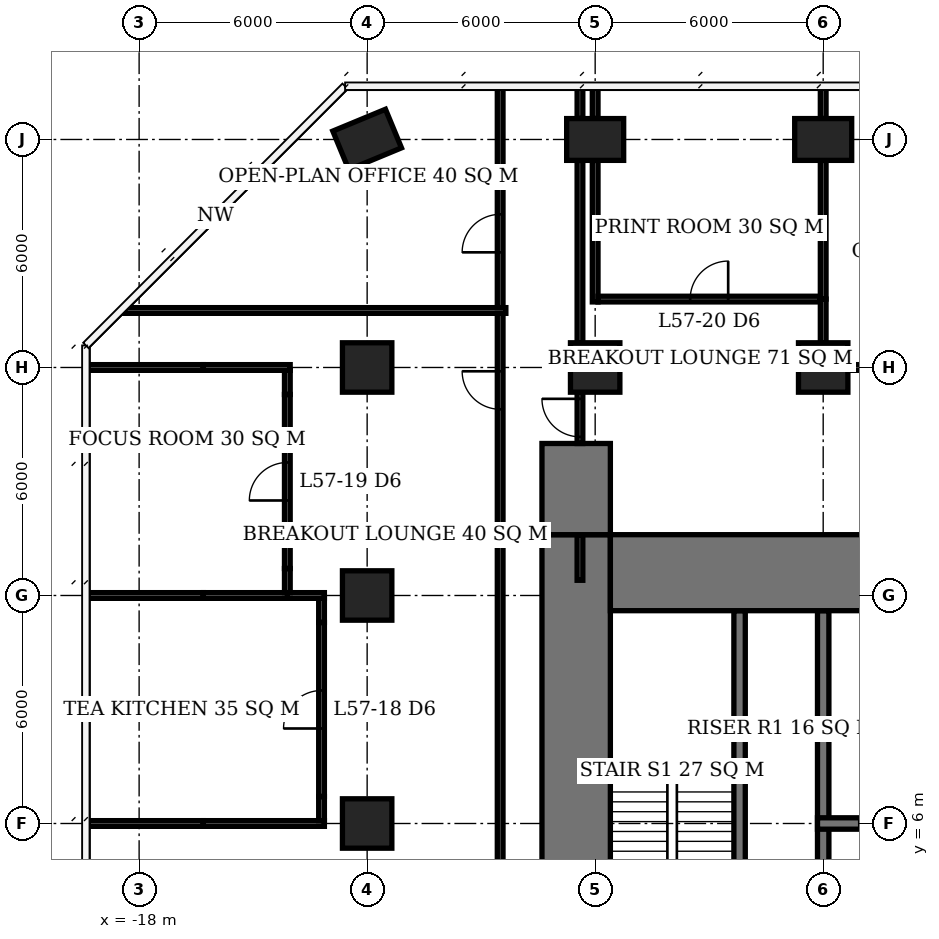
"""IFC4 building model, lengths in metres.
Left out: names, types, materials, properties, quantities, classifications, styles, units other than length and angle.
Written with IfcOpenShell. Run it as: python <this file> out.ifc"""

import sys

from ifc_helpers import new_model, si_unit, direction, frame, frame_2d, origin, origin_2d, place, context, subcontext, project, spatial, rectangle, extrude, element, fill, save


model = new_model("IFC4")
c1 = context("Model", 3, precision=1e-05, world=origin(), true_north=direction((0.0, 1.0)))
c2 = subcontext(c1, "Body", "Model", "MODEL_VIEW")
j1 = project(units=[si_unit("LENGTHUNIT", "METRE"), si_unit("PLANEANGLEUNIT", "RADIAN")], contexts=[c1])
p1 = place(None, origin())
s1 = spatial("IfcSite", under=j1, at=p1, CompositionType="ELEMENT")
p2 = place(p1, origin())
s2 = spatial("IfcBuilding", under=s1, at=p2, CompositionType="ELEMENT")
p3 = place(p2, frame((0.0, 0.0, 231.8)))
s3 = spatial("IfcBuildingStorey", under=s2, at=p3, CompositionType="ELEMENT", Elevation=231.8)
for number, where, z_axis, x_axis in (
    (1, (-12.0, 6.0, 0.0), (0.0, 0.0, 1.0), (1.0, 0.0, 0.0)),
    (2, (-12.0, 12.0, 0.0), (0.0, 0.0, 1.0), (1.0, 0.0, 0.0)),
    (3, (-12.0, 18.0, 0.0), (0.0, 0.0, 1.0), (1.0, 0.0, 0.0)),
):
    element("IfcColumn", number, at=place(p3, frame(where, z_axis=z_axis, x_axis=x_axis)), inside=s3, PredefinedType="COLUMN", context=c2, shape_type="SweptSolid", body=[
        extrude(rectangle(XDim=1.3, YDim=1.3, at=origin_2d()), origin(), (0.0, 0.0, 1.0), 3.9),
    ])
p4 = place(p3, frame((-12.0, 24.0, 0.0), z_axis=(0.0, 0.0, 1.0), x_axis=(0.923879532511, 0.382683432365, 0.0)))
e4 = element("IfcColumn", 4, at=p4, inside=s3, PredefinedType="COLUMN", context=c2, shape_type="SweptSolid", body=[
    extrude(rectangle(XDim=1.5, YDim=1.1, at=origin_2d()), origin(), (0.0, 0.0, 1.0), 3.9),
])
p5 = place(p3, frame((-6.0, 18.0, 0.0), z_axis=(0.0, 0.0, 1.0), x_axis=(1.0, 0.0, 0.0)))
e5 = element("IfcColumn", 5, at=p5, inside=s3, PredefinedType="COLUMN", context=c2, shape_type="SweptSolid", body=[
    extrude(rectangle(XDim=1.3, YDim=1.3, at=origin_2d()), origin(), (0.0, 0.0, 1.0), 3.9),
])
p6 = place(p3, frame((-6.0, 24.0, 0.0), z_axis=(0.0, 0.0, 1.0), x_axis=(1.0, 0.0, 0.0)))
e6 = element("IfcColumn", 6, at=p6, inside=s3, PredefinedType="COLUMN", context=c2, shape_type="SweptSolid", body=[
    extrude(rectangle(XDim=1.5, YDim=1.1, at=origin_2d()), origin(), (0.0, 0.0, 1.0), 3.9),
])
p7 = place(p3, frame((0.0, 18.0, 0.0), z_axis=(0.0, 0.0, 1.0), x_axis=(1.0, 0.0, 0.0)))
e7 = element("IfcColumn", 7, at=p7, inside=s3, PredefinedType="COLUMN", context=c2, shape_type="SweptSolid", body=[
    extrude(rectangle(XDim=1.3, YDim=1.3, at=origin_2d()), origin(), (0.0, 0.0, 1.0), 3.9),
])
p8 = place(p3, frame((0.0, 24.0, 0.0), z_axis=(0.0, 0.0, 1.0), x_axis=(1.0, 0.0, 0.0)))
e8 = element("IfcColumn", 8, at=p8, inside=s3, PredefinedType="COLUMN", context=c2, shape_type="SweptSolid", body=[
    extrude(rectangle(XDim=1.5, YDim=1.1, at=origin_2d()), origin(), (0.0, 0.0, 1.0), 3.9),
])
p9 = place(p3, frame((-5.6, 12.6, 0.0), z_axis=(0.0, 0.0, 1.0), x_axis=(1.0, 0.0, 0.0)))
e9 = element("IfcWall", 9, at=p9, inside=s3, PredefinedType="SHEAR", context=c2, shape_type="SweptSolid", body=[
    extrude(rectangle(XDim=23.2, YDim=2.0, at=frame_2d((11.6, 0.0))), origin(), (0.0, 0.0, 1.0), 3.9),
])
p10 = place(p3, frame((-6.5, -7.6, 0.0), z_axis=(0.0, 0.0, 1.0), x_axis=(0.0, 1.0, 0.0)))
e10 = element("IfcWall", 10, at=p10, inside=s3, PredefinedType="SHEAR", context=c2, shape_type="SweptSolid", body=[
    extrude(rectangle(XDim=21.2, YDim=1.8, at=frame_2d((10.6, 0.0))), origin(), (0.0, 0.0, 1.0), 3.9),
])
p11 = place(p10, frame((7.8, 0.0, 0.0)))
e11 = element("IfcOpeningElement", 11, at=p11, cuts=e10, PredefinedType="OPENING", context=c2, shape_type="SweptSolid", body=[
    extrude(rectangle(XDim=1.8, YDim=2.4, at=frame_2d((0.9, 1.2))), frame((0.0, 0.91, 0.0), z_axis=(0.0, -1.0, 0.0), x_axis=(1.0, 0.0, 0.0)), (0.0, 0.0, 1.0), 1.82),
])
p12 = place(p3, frame((-6.5, 13.6, 0.0), z_axis=(0.0, 0.0, 1.0), x_axis=(0.0, 1.0, 0.0)))
e12 = element("IfcWall", 12, at=p12, inside=s3, PredefinedType="SHEAR", context=c2, shape_type="SweptSolid", body=[
    extrude(rectangle(XDim=2.4, YDim=1.8, at=frame_2d((1.2, 0.0))), origin(), (0.0, 0.0, 1.0), 3.9),
])
p13 = place(p3, frame((-0.15, 6.0, 0.0), z_axis=(0.0, 0.0, 1.0), x_axis=(1.0, 0.0, 0.0)))
e13 = element("IfcWall", 13, at=p13, inside=s3, PredefinedType="SHEAR", context=c2, shape_type="SweptSolid", body=[
    extrude(rectangle(XDim=17.75, YDim=0.3, at=frame_2d((8.875, 0.0))), origin(), (0.0, 0.0, 1.0), 3.9),
])
p14 = place(p13, frame((13.15, 0.0, 0.0)))
e14 = element("IfcOpeningElement", 14, at=p14, cuts=e13, PredefinedType="OPENING", context=c2, shape_type="SweptSolid", body=[
    extrude(rectangle(XDim=0.9, YDim=2.1, at=frame_2d((0.45, 1.05))), frame((0.0, 0.16, 0.0), z_axis=(0.0, -1.0, 0.0), x_axis=(1.0, 0.0, 0.0)), (0.0, 0.0, 1.0), 0.32),
])
p15 = place(p13, frame((16.25, 0.0, 0.0)))
e15 = element("IfcOpeningElement", 15, at=p15, cuts=e13, PredefinedType="OPENING", context=c2, shape_type="SweptSolid", body=[
    extrude(rectangle(XDim=1.0, YDim=2.1, at=frame_2d((0.5, 1.05))), frame((0.0, 0.16, 0.0), z_axis=(0.0, -1.0, 0.0), x_axis=(1.0, 0.0, 0.0)), (0.0, 0.0, 1.0), 0.32),
])
p16 = place(p13, frame((7.25, 0.0, 0.0)))
e16 = element("IfcOpeningElement", 16, at=p16, cuts=e13, PredefinedType="OPENING", context=c2, shape_type="SweptSolid", body=[
    extrude(rectangle(XDim=1.0, YDim=2.1, at=frame_2d((0.5, 1.05))), frame((0.0, 0.16, 0.0), z_axis=(0.0, -1.0, 0.0), x_axis=(1.0, 0.0, 0.0)), (0.0, 0.0, 1.0), 0.32),
])
p17 = place(p13, frame((1.1, 0.0, 0.0)))
e17 = element("IfcOpeningElement", 17, at=p17, cuts=e13, PredefinedType="OPENING", context=c2, shape_type="SweptSolid", body=[
    extrude(rectangle(XDim=1.1, YDim=2.1, at=frame_2d((0.55, 1.05))), frame((0.0, 0.16, 0.0), z_axis=(0.0, -1.0, 0.0), x_axis=(1.0, 0.0, 0.0)), (0.0, 0.0, 1.0), 0.32),
])
p18 = place(p13, frame((4.1, 0.0, 0.0)))
e18 = element("IfcOpeningElement", 18, at=p18, cuts=e13, PredefinedType="OPENING", context=c2, shape_type="SweptSolid", body=[
    extrude(rectangle(XDim=1.1, YDim=2.1, at=frame_2d((0.55, 1.05))), frame((0.0, 0.16, 0.0), z_axis=(0.0, -1.0, 0.0), x_axis=(1.0, 0.0, 0.0)), (0.0, 0.0, 1.0), 0.32),
])
for number, where, z_axis, x_axis in (
    (19, (0.0, 3.15, 0.0), (0.0, 0.0, 1.0), (0.0, 1.0, 0.0)),
    (20, (-2.2, 3.15, 0.0), (0.0, 0.0, 1.0), (0.0, 1.0, 0.0)),
):
    element("IfcWall", number, at=place(p3, frame(where, z_axis=z_axis, x_axis=x_axis)), inside=s3, PredefinedType="SHEAR", context=c2, shape_type="SweptSolid", body=[
        extrude(rectangle(XDim=8.45, YDim=0.3, at=frame_2d((4.225, 0.0))), origin(), (0.0, 0.0, 1.0), 3.9),
    ])
p19 = place(p3, frame((-19.35, 6.0, 0.0), z_axis=(0.0, 0.0, 1.0), x_axis=(1.0, 0.0, 0.0)))
e21 = element("IfcWall", 21, at=p19, inside=s3, PredefinedType="PARTITIONING", context=c2, shape_type="SweptSolid", body=[
    extrude(rectangle(XDim=3.04, YDim=0.15, at=frame_2d((1.52, 0.0))), origin(), (0.0, 0.0, 1.0), 3.65),
])
p20 = place(p3, frame((-16.31, 6.0, 0.0), z_axis=(0.0, 0.0, 1.0), x_axis=(1.0, 0.0, 0.0)))
e22 = element("IfcWall", 22, at=p20, inside=s3, PredefinedType="PARTITIONING", context=c2, shape_type="SweptSolid", body=[
    extrude(rectangle(XDim=3.185, YDim=0.15, at=frame_2d((1.593, 0.0))), origin(), (0.0, 0.0, 1.0), 2.65),
])
p21 = place(p3, frame((-19.4, 12.0, 0.0), z_axis=(0.0, 0.0, 1.0), x_axis=(1.0, 0.0, 0.0)))
e23 = element("IfcWall", 23, at=p21, inside=s3, PredefinedType="PARTITIONING", context=c2, shape_type="SweptSolid", body=[
    extrude(rectangle(XDim=3.09, YDim=0.15, at=frame_2d((1.545, 0.0))), origin(), (0.0, 0.0, 1.0), 3.65),
])
p22 = place(p3, frame((-16.31, 12.0, 0.0), z_axis=(0.0, 0.0, 1.0), x_axis=(1.0, 0.0, 0.0)))
e24 = element("IfcWall", 24, at=p22, inside=s3, PredefinedType="PARTITIONING", context=c2, shape_type="SweptSolid", body=[
    extrude(rectangle(XDim=2.285, YDim=0.15, at=frame_2d((1.143, 0.0))), origin(), (0.0, 0.0, 1.0), 2.65),
])
p23 = place(p3, frame((-14.1, 12.0, 0.0), z_axis=(0.0, 0.0, 1.0), x_axis=(1.0, 0.0, 0.0)))
e25 = element("IfcWall", 25, at=p23, inside=s3, PredefinedType="PARTITIONING", context=c2, shape_type="SweptSolid", body=[
    extrude(rectangle(XDim=0.975, YDim=0.15, at=frame_2d((0.488, 0.0))), origin(), (0.0, 0.0, 1.0), 2.65),
])
p24 = place(p3, frame((-19.4, 18.0, 0.0), z_axis=(0.0, 0.0, 1.0), x_axis=(1.0, 0.0, 0.0)))
e26 = element("IfcWall", 26, at=p24, inside=s3, PredefinedType="PARTITIONING", context=c2, shape_type="SweptSolid", body=[
    extrude(rectangle(XDim=3.09, YDim=0.15, at=frame_2d((1.545, 0.0))), origin(), (0.0, 0.0, 1.0), 3.65),
])
p25 = place(p3, frame((-16.31, 18.0, 0.0), z_axis=(0.0, 0.0, 1.0), x_axis=(1.0, 0.0, 0.0)))
e27 = element("IfcWall", 27, at=p25, inside=s3, PredefinedType="PARTITIONING", context=c2, shape_type="SweptSolid", body=[
    extrude(rectangle(XDim=2.285, YDim=0.15, at=frame_2d((1.143, 0.0))), origin(), (0.0, 0.0, 1.0), 2.65),
])
p26 = place(p3, frame((0.65, 18.0, 0.0), z_axis=(0.0, 0.0, 1.0), x_axis=(1.0, 0.0, 0.0)))
e28 = element("IfcWall", 28, at=p26, inside=s3, PredefinedType="PARTITIONING", context=c2, shape_type="SweptSolid", body=[
    extrude(rectangle(XDim=4.7, YDim=0.15, at=frame_2d((2.35, 0.0))), origin(), (0.0, 0.0, 1.0), 3.65),
])
p27 = place(p26, frame((1.85, 0.0, 0.0)))
e29 = element("IfcOpeningElement", 29, at=p27, cuts=e28, PredefinedType="OPENING", context=c2, shape_type="SweptSolid", body=[
    extrude(rectangle(XDim=1.0, YDim=2.1, at=frame_2d((0.5, 1.05))), frame((0.0, 0.085, 0.0), z_axis=(0.0, -1.0, 0.0), x_axis=(1.0, 0.0, 0.0)), (0.0, 0.0, 1.0), 0.17),
])
p28 = place(p3, frame((-5.925, 19.8, 0.0), z_axis=(0.0, 0.0, 1.0), x_axis=(1.0, 0.0, 0.0)))
e30 = element("IfcWall", 30, at=p28, inside=s3, PredefinedType="PARTITIONING", context=c2, shape_type="SweptSolid", body=[
    extrude(rectangle(XDim=5.85, YDim=0.15, at=frame_2d((2.925, 0.0))), origin(), (0.0, 0.0, 1.0), 3.65),
])
p29 = place(p28, frame((2.425, 0.0, 0.0)))
e31 = element("IfcOpeningElement", 31, at=p29, cuts=e30, PredefinedType="OPENING", context=c2, shape_type="SweptSolid", body=[
    extrude(rectangle(XDim=1.0, YDim=2.1, at=frame_2d((0.5, 1.05))), frame((0.0, 0.085, 0.0), z_axis=(0.0, -1.0, 0.0), x_axis=(1.0, 0.0, 0.0)), (0.0, 0.0, 1.0), 0.17),
])
p30 = place(p3, frame((-14.1, 12.075, 0.0), z_axis=(0.0, 0.0, 1.0), x_axis=(0.0, 1.0, 0.0)))
e32 = element("IfcWall", 32, at=p30, inside=s3, PredefinedType="PARTITIONING", context=c2, shape_type="SweptSolid", body=[
    extrude(rectangle(XDim=0.635, YDim=0.15, at=frame_2d((0.317, 0.0))), origin(), (0.0, 0.0, 1.0), 2.65),
])
p31 = place(p3, frame((-14.1, 12.71, 0.0), z_axis=(0.0, 0.0, 1.0), x_axis=(0.0, 1.0, 0.0)))
e33 = element("IfcWall", 33, at=p31, inside=s3, PredefinedType="PARTITIONING", context=c2, shape_type="SweptSolid", body=[
    extrude(rectangle(XDim=4.58, YDim=0.15, at=frame_2d((2.29, 0.0))), origin(), (0.0, 0.0, 1.0), 3.65),
])
p32 = place(p31, frame((1.79, 0.0, 0.0)))
e34 = element("IfcOpeningElement", 34, at=p32, cuts=e33, PredefinedType="OPENING", context=c2, shape_type="SweptSolid", body=[
    extrude(rectangle(XDim=1.0, YDim=2.1, at=frame_2d((0.5, 1.05))), frame((0.0, 0.085, 0.0), z_axis=(0.0, -1.0, 0.0), x_axis=(1.0, 0.0, 0.0)), (0.0, 0.0, 1.0), 0.17),
])
for number, where, z_axis, x_axis in (
    (35, (-14.1, 17.29, 0.0), (0.0, 0.0, 1.0), (0.0, 1.0, 0.0)),
    (36, (-13.2, 6.075, 0.0), (0.0, 0.0, 1.0), (0.0, 1.0, 0.0)),
):
    element("IfcWall", number, at=place(p3, frame(where, z_axis=z_axis, x_axis=x_axis)), inside=s3, PredefinedType="PARTITIONING", context=c2, shape_type="SweptSolid", body=[
        extrude(rectangle(XDim=0.635, YDim=0.15, at=frame_2d((0.317, 0.0))), origin(), (0.0, 0.0, 1.0), 2.65),
    ])
p33 = place(p3, frame((-13.2, 6.71, 0.0), z_axis=(0.0, 0.0, 1.0), x_axis=(0.0, 1.0, 0.0)))
e37 = element("IfcWall", 37, at=p33, inside=s3, PredefinedType="PARTITIONING", context=c2, shape_type="SweptSolid", body=[
    extrude(rectangle(XDim=4.58, YDim=0.15, at=frame_2d((2.29, 0.0))), origin(), (0.0, 0.0, 1.0), 3.65),
])
p34 = place(p33, frame((1.79, 0.0, 0.0)))
e38 = element("IfcOpeningElement", 38, at=p34, cuts=e37, PredefinedType="OPENING", context=c2, shape_type="SweptSolid", body=[
    extrude(rectangle(XDim=1.0, YDim=2.1, at=frame_2d((0.5, 1.05))), frame((0.0, 0.085, 0.0), z_axis=(0.0, -1.0, 0.0), x_axis=(1.0, 0.0, 0.0)), (0.0, 0.0, 1.0), 0.17),
])
p35 = place(p3, frame((-13.2, 11.29, 0.0), z_axis=(0.0, 0.0, 1.0), x_axis=(0.0, 1.0, 0.0)))
e39 = element("IfcWall", 39, at=p35, inside=s3, PredefinedType="PARTITIONING", context=c2, shape_type="SweptSolid", body=[
    extrude(rectangle(XDim=0.635, YDim=0.15, at=frame_2d((0.317, 0.0))), origin(), (0.0, 0.0, 1.0), 2.65),
])
p36 = place(p3, frame((-6.0, 19.725, 0.0), z_axis=(0.0, 0.0, 1.0), x_axis=(0.0, 1.0, 0.0)))
e40 = element("IfcWall", 40, at=p36, inside=s3, PredefinedType="PARTITIONING", context=c2, shape_type="SweptSolid", body=[
    extrude(rectangle(XDim=3.725, YDim=0.15, at=frame_2d((1.862, 0.0))), origin(), (0.0, 0.0, 1.0), 3.65),
])
p37 = place(p3, frame((-6.0, 24.55, 0.0), z_axis=(0.0, 0.0, 1.0), x_axis=(0.0, 1.0, 0.0)))
e41 = element("IfcWall", 41, at=p37, inside=s3, PredefinedType="PARTITIONING", context=c2, shape_type="SweptSolid", body=[
    extrude(rectangle(XDim=0.85, YDim=0.15, at=frame_2d((0.425, 0.0))), origin(), (0.0, 0.0, 1.0), 3.65),
])
p38 = place(p3, frame((0.0, 18.65, 0.0), z_axis=(0.0, 0.0, 1.0), x_axis=(0.0, 1.0, 0.0)))
e42 = element("IfcWall", 42, at=p38, inside=s3, PredefinedType="PARTITIONING", context=c2, shape_type="SweptSolid", body=[
    extrude(rectangle(XDim=1.15, YDim=0.15, at=frame_2d((0.575, 0.0))), origin(), (0.0, 0.0, 1.0), 3.65),
])
p39 = place(p3, frame((0.0, 19.8, 0.0), z_axis=(0.0, 0.0, 1.0), x_axis=(0.0, 1.0, 0.0)))
e43 = element("IfcWall", 43, at=p39, inside=s3, PredefinedType="PARTITIONING", context=c2, shape_type="SweptSolid", body=[
    extrude(rectangle(XDim=3.65, YDim=0.15, at=frame_2d((1.825, 0.0))), origin(), (0.0, 0.0, 1.0), 3.65),
])
p40 = place(p3, frame((0.0, 24.55, 0.0), z_axis=(0.0, 0.0, 1.0), x_axis=(0.0, 1.0, 0.0)))
e44 = element("IfcWall", 44, at=p40, inside=s3, PredefinedType="PARTITIONING", context=c2, shape_type="SweptSolid", body=[
    extrude(rectangle(XDim=0.8, YDim=0.15, at=frame_2d((0.4, 0.0))), origin(), (0.0, 0.0, 1.0), 3.65),
])
p41 = place(p3, frame((-18.388, 19.5, 0.0), z_axis=(0.0, 0.0, 1.0), x_axis=(1.0, 0.0, 0.0)))
e45 = element("IfcWall", 45, at=p41, inside=s3, PredefinedType="PARTITIONING", context=c2, shape_type="SweptSolid", body=[
    extrude(rectangle(XDim=10.038, YDim=0.15, at=frame_2d((5.019, 0.0))), origin(), (0.0, 0.0, 1.0), 3.65),
])
p42 = place(p3, frame((-14.025, 13.5, 0.0), z_axis=(0.0, 0.0, 1.0), x_axis=(1.0, 0.0, 0.0)))
e46 = element("IfcWall", 46, at=p42, inside=s3, PredefinedType="PARTITIONING", context=c2, shape_type="SweptSolid", body=[
    extrude(rectangle(XDim=5.675, YDim=0.15, at=frame_2d((2.837, 0.0))), origin(), (0.0, 0.0, 1.0), 3.65),
])
p43 = place(p3, frame((-8.5, -12.708, 0.0), z_axis=(0.0, 0.0, 1.0), x_axis=(0.0, 1.0, 0.0)))
e47 = element("IfcWall", 47, at=p43, inside=s3, PredefinedType="PARTITIONING", context=c2, shape_type="SweptSolid", body=[
    extrude(rectangle(XDim=26.133, YDim=0.15, at=frame_2d((13.066, 0.0))), origin(), (0.0, 0.0, 1.0), 3.65),
])
p44 = place(p43, frame((14.228, 0.0, 0.0)))
e48 = element("IfcOpeningElement", 48, at=p44, cuts=e47, PredefinedType="OPENING", context=c2, shape_type="SweptSolid", body=[
    extrude(rectangle(XDim=1.0, YDim=2.1, at=frame_2d((0.5, 1.05))), frame((0.0, 0.085, 0.0), z_axis=(0.0, -1.0, 0.0), x_axis=(1.0, 0.0, 0.0)), (0.0, 0.0, 1.0), 0.17),
])
p45 = place(p3, frame((-8.5, 13.575, 0.0), z_axis=(0.0, 0.0, 1.0), x_axis=(0.0, 1.0, 0.0)))
e49 = element("IfcWall", 49, at=p45, inside=s3, PredefinedType="PARTITIONING", context=c2, shape_type="SweptSolid", body=[
    extrude(rectangle(XDim=5.85, YDim=0.15, at=frame_2d((2.925, 0.0))), origin(), (0.0, 0.0, 1.0), 3.65),
])
p46 = place(p45, frame((3.325, 0.0, 0.0)))
e50 = element("IfcOpeningElement", 50, at=p46, cuts=e49, PredefinedType="OPENING", context=c2, shape_type="SweptSolid", body=[
    extrude(rectangle(XDim=1.0, YDim=2.1, at=frame_2d((0.5, 1.05))), frame((0.0, 0.085, 0.0), z_axis=(0.0, -1.0, 0.0), x_axis=(1.0, 0.0, 0.0)), (0.0, 0.0, 1.0), 0.17),
])
p47 = place(p3, frame((-8.5, 19.575, 0.0), z_axis=(0.0, 0.0, 1.0), x_axis=(0.0, 1.0, 0.0)))
e51 = element("IfcWall", 51, at=p47, inside=s3, PredefinedType="PARTITIONING", context=c2, shape_type="SweptSolid", body=[
    extrude(rectangle(XDim=5.825, YDim=0.15, at=frame_2d((2.913, 0.0))), origin(), (0.0, 0.0, 1.0), 3.65),
])
p48 = place(p47, frame((1.455, 0.0, 0.0)))
e52 = element("IfcOpeningElement", 52, at=p48, cuts=e51, PredefinedType="OPENING", context=c2, shape_type="SweptSolid", body=[
    extrude(rectangle(XDim=1.0, YDim=2.1, at=frame_2d((0.5, 1.05))), frame((0.0, 0.085, 0.0), z_axis=(0.0, -1.0, 0.0), x_axis=(1.0, 0.0, 0.0)), (0.0, 0.0, 1.0), 0.17),
])
p49 = place(p3, frame((-6.4, 12.4, 0.0), z_axis=(0.0, 0.0, 1.0), x_axis=(0.0, 1.0, 0.0)))
e53 = element("IfcWall", 53, at=p49, inside=s3, PredefinedType="PARTITIONING", context=c2, shape_type="SweptSolid", body=[
    extrude(rectangle(XDim=1.2, YDim=0.15, at=frame_2d((0.6, 0.0))), origin(), (0.0, 0.0, 1.0), 3.65),
])
p50 = place(p3, frame((-6.4, 16.0, 0.0), z_axis=(0.0, 0.0, 1.0), x_axis=(0.0, 1.0, 0.0)))
e54 = element("IfcWall", 54, at=p50, inside=s3, PredefinedType="PARTITIONING", context=c2, shape_type="SweptSolid", body=[
    extrude(rectangle(XDim=1.35, YDim=0.15, at=frame_2d((0.675, 0.0))), origin(), (0.0, 0.0, 1.0), 3.65),
])
p51 = place(p50, frame((0.175, 0.0, 0.0)))
e55 = element("IfcOpeningElement", 55, at=p51, cuts=e54, PredefinedType="OPENING", context=c2, shape_type="SweptSolid", body=[
    extrude(rectangle(XDim=1.0, YDim=2.1, at=frame_2d((0.5, 1.05))), frame((0.0, 0.085, 0.0), z_axis=(0.0, -1.0, 0.0), x_axis=(1.0, 0.0, 0.0)), (0.0, 0.0, 1.0), 0.17),
])
p52 = place(p3, frame((-6.4, 18.65, 0.0), z_axis=(0.0, 0.0, 1.0), x_axis=(0.0, 1.0, 0.0)))
e56 = element("IfcWall", 56, at=p52, inside=s3, PredefinedType="PARTITIONING", context=c2, shape_type="SweptSolid", body=[
    extrude(rectangle(XDim=4.8, YDim=0.15, at=frame_2d((2.4, 0.0))), origin(), (0.0, 0.0, 1.0), 3.65),
])
p53 = place(p3, frame((-6.4, 24.55, 0.0), z_axis=(0.0, 0.0, 1.0), x_axis=(0.0, 1.0, 0.0)))
e57 = element("IfcWall", 57, at=p53, inside=s3, PredefinedType="PARTITIONING", context=c2, shape_type="SweptSolid", body=[
    extrude(rectangle(XDim=0.8, YDim=0.15, at=frame_2d((0.4, 0.0))), origin(), (0.0, 0.0, 1.0), 3.65),
])
p54 = place(p34, origin())
e58 = element("IfcDoor", 58, at=p54, inside=s3, OperationType="SINGLE_SWING_LEFT", PredefinedType="DOOR", context=c2, shape_type="SweptSolid", body=[
    extrude(rectangle(XDim=1.0, YDim=2.1, at=frame_2d((0.5, 1.05))), frame((0.0, 0.025, 0.0), z_axis=(0.0, -1.0, 0.0), x_axis=(1.0, 0.0, 0.0)), (0.0, 0.0, 1.0), 0.05),
])
fill(e38, e58)
p55 = place(p32, origin())
e59 = element("IfcDoor", 59, at=p55, inside=s3, OperationType="SINGLE_SWING_LEFT", PredefinedType="DOOR", context=c2, shape_type="SweptSolid", body=[
    extrude(rectangle(XDim=1.0, YDim=2.1, at=frame_2d((0.5, 1.05))), frame((0.0, 0.025, 0.0), z_axis=(0.0, -1.0, 0.0), x_axis=(1.0, 0.0, 0.0)), (0.0, 0.0, 1.0), 0.05),
])
fill(e34, e59)
p56 = place(p29, origin())
e60 = element("IfcDoor", 60, at=p56, inside=s3, OperationType="SINGLE_SWING_RIGHT", PredefinedType="DOOR", context=c2, shape_type="SweptSolid", body=[
    extrude(rectangle(XDim=1.0, YDim=2.1, at=frame_2d((0.5, 1.05))), frame((0.0, 0.025, 0.0), z_axis=(0.0, -1.0, 0.0), x_axis=(1.0, 0.0, 0.0)), (0.0, 0.0, 1.0), 0.05),
])
fill(e31, e60)
p57 = place(p46, origin())
e61 = element("IfcDoor", 61, at=p57, inside=s3, OperationType="SINGLE_SWING_RIGHT", PredefinedType="DOOR", context=c2, shape_type="SweptSolid", body=[
    extrude(rectangle(XDim=1.0, YDim=2.1, at=frame_2d((0.5, 1.05))), frame((0.0, 0.025, 0.0), z_axis=(0.0, -1.0, 0.0), x_axis=(1.0, 0.0, 0.0)), (0.0, 0.0, 1.0), 0.05),
])
fill(e50, e61)
p58 = place(p48, origin())
e62 = element("IfcDoor", 62, at=p58, inside=s3, OperationType="SINGLE_SWING_LEFT", PredefinedType="DOOR", context=c2, shape_type="SweptSolid", body=[
    extrude(rectangle(XDim=1.0, YDim=2.1, at=frame_2d((0.5, 1.05))), frame((0.0, 0.025, 0.0), z_axis=(0.0, -1.0, 0.0), x_axis=(1.0, 0.0, 0.0)), (0.0, 0.0, 1.0), 0.05),
])
fill(e52, e62)
p59 = place(p51, origin())
e63 = element("IfcDoor", 63, at=p59, inside=s3, OperationType="SINGLE_SWING_RIGHT", PredefinedType="DOOR", context=c2, shape_type="SweptSolid", body=[
    extrude(rectangle(XDim=1.0, YDim=2.1, at=frame_2d((0.5, 1.05))), frame((0.0, 0.025, 0.0), z_axis=(0.0, -1.0, 0.0), x_axis=(1.0, 0.0, 0.0)), (0.0, 0.0, 1.0), 0.05),
])
fill(e55, e63)
save(model, sys.argv[1])
